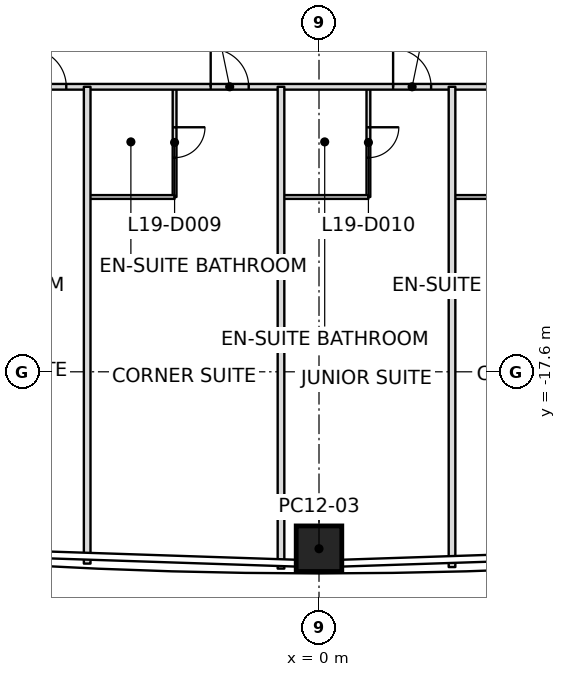
"""IFC4 building model, lengths in metres.
Left out: names, types, materials, properties, quantities, classifications, styles, units other than length and angle.
Written with IfcOpenShell. Run it as: python <this file> out.ifc"""

import sys

from ifc_helpers import new_model, si_unit, direction, frame, frame_2d, origin, origin_2d, place, context, subcontext, project, spatial, rectangle, extrude, element, fill, save


model = new_model("IFC4")
c1 = context("Model", 3, precision=1e-05, world=origin(), true_north=direction((0.0, 1.0)))
c2 = subcontext(c1, "Body", "Model", "MODEL_VIEW")
j1 = project(units=[si_unit("LENGTHUNIT", "METRE"), si_unit("PLANEANGLEUNIT", "RADIAN")], contexts=[c1])
p1 = place(None, origin())
s1 = spatial("IfcSite", under=j1, at=p1, CompositionType="ELEMENT")
p2 = place(p1, origin())
s2 = spatial("IfcBuilding", under=s1, at=p2, CompositionType="ELEMENT")
p3 = place(p2, frame((0.0, 0.0, 92.4)))
s3 = spatial("IfcBuildingStorey", under=s2, at=p3, CompositionType="ELEMENT", Elevation=92.4)
p4 = place(p3, frame((0.0, -22.256, 0.0), z_axis=(0.0, 0.012337408793, 0.999923891276), x_axis=(1.0, 0.0, 0.0)))
e1 = element("IfcColumn", 1, at=p4, inside=s3, PredefinedType="COLUMN", context=c2, shape_type="SweptSolid", body=[
    extrude(rectangle(XDim=1.2, YDim=1.2, at=origin_2d()), origin(), (0.0, 0.0, 1.0), 3.7),
])
p5 = place(p3, frame((-6.1, -10.1, 0.0), z_axis=(0.0, 0.0, 1.0), x_axis=(0.0, -1.0, 0.0)))
e2 = element("IfcWall", 2, at=p5, inside=s3, PredefinedType="PARTITIONING", context=c2, shape_type="SweptSolid", body=[
    extrude(rectangle(XDim=12.547, YDim=0.175, at=frame_2d((6.273, 0.0))), origin(), (0.0, 0.0, 1.0), 2.934),
])
p6 = place(p3, frame((-1.0, -10.1, 0.0), z_axis=(0.0, 0.0, 1.0), x_axis=(0.0, -1.0, 0.0)))
e3 = element("IfcWall", 3, at=p6, inside=s3, PredefinedType="PARTITIONING", context=c2, shape_type="SweptSolid", body=[
    extrude(rectangle(XDim=12.678, YDim=0.175, at=frame_2d((6.339, 0.0))), origin(), (0.0, 0.0, 1.0), 2.934),
])
p7 = place(p3, frame((3.5, -10.1, 0.0), z_axis=(0.0, 0.0, 1.0), x_axis=(0.0, -1.0, 0.0)))
e4 = element("IfcWall", 4, at=p7, inside=s3, PredefinedType="PARTITIONING", context=c2, shape_type="SweptSolid", body=[
    extrude(rectangle(XDim=12.638, YDim=0.175, at=frame_2d((6.319, 0.0))), origin(), (0.0, 0.0, 1.0), 2.934),
])
p8 = place(p3, frame((-13.02, -10.1, 0.0), z_axis=(0.0, 0.0, 1.0), x_axis=(1.0, 0.0, 0.0)))
e5 = element("IfcWall", 5, at=p8, inside=s3, PredefinedType="PARTITIONING", context=c2, shape_type="SweptSolid", body=[
    extrude(rectangle(XDim=26.04, YDim=0.15, at=frame_2d((13.02, 0.0))), origin(), (0.0, 0.0, 1.0), 2.947),
])
p9 = place(p8, frame((5.37, 0.0, 0.0)))
e6 = element("IfcOpeningElement", 6, at=p9, cuts=e5, PredefinedType="OPENING", context=c2, shape_type="SweptSolid", body=[
    extrude(rectangle(XDim=1.0, YDim=2.1, at=frame_2d((0.5, 1.05))), frame((0.0, 0.075, 0.0), z_axis=(0.0, -1.0, 0.0), x_axis=(1.0, 0.0, 0.0)), (0.0, 0.0, 1.0), 0.15),
])
p10 = place(p8, frame((10.17, 0.0, 0.0)))
e7 = element("IfcOpeningElement", 7, at=p10, cuts=e5, PredefinedType="OPENING", context=c2, shape_type="SweptSolid", body=[
    extrude(rectangle(XDim=1.0, YDim=2.1, at=frame_2d((0.5, 1.05))), frame((0.0, 0.075, 0.0), z_axis=(0.0, -1.0, 0.0), x_axis=(1.0, 0.0, 0.0)), (0.0, 0.0, 1.0), 0.15),
])
p11 = place(p8, frame((14.97, 0.0, 0.0)))
e8 = element("IfcOpeningElement", 8, at=p11, cuts=e5, PredefinedType="OPENING", context=c2, shape_type="SweptSolid", body=[
    extrude(rectangle(XDim=1.0, YDim=2.1, at=frame_2d((0.5, 1.05))), frame((0.0, 0.075, 0.0), z_axis=(0.0, -1.0, 0.0), x_axis=(1.0, 0.0, 0.0)), (0.0, 0.0, 1.0), 0.15),
])
p12 = place(p8, frame((19.77, 0.0, 0.0)))
e9 = element("IfcOpeningElement", 9, at=p12, cuts=e5, PredefinedType="OPENING", context=c2, shape_type="SweptSolid", body=[
    extrude(rectangle(XDim=1.0, YDim=2.1, at=frame_2d((0.5, 1.05))), frame((0.0, 0.075, 0.0), z_axis=(0.0, -1.0, 0.0), x_axis=(1.0, 0.0, 0.0)), (0.0, 0.0, 1.0), 0.15),
])
p13 = place(p3, frame((-3.8, -10.13, 0.0), z_axis=(0.0, 0.0, 1.0), x_axis=(0.0, -1.0, 0.0)))
e10 = element("IfcWall", 10, at=p13, inside=s3, PredefinedType="PARTITIONING", context=c2, shape_type="SweptSolid", body=[
    extrude(rectangle(XDim=2.87, YDim=0.1, at=frame_2d((1.435, 0.0))), origin(), (0.0, 0.0, 1.0), 3.15),
])
p14 = place(p13, frame((1.035, 0.0, 0.0)))
e11 = element("IfcOpeningElement", 11, at=p14, cuts=e10, PredefinedType="OPENING", context=c2, shape_type="SweptSolid", body=[
    extrude(rectangle(XDim=0.8, YDim=2.1, at=frame_2d((0.4, 1.05))), frame((0.0, 0.05, 0.0), z_axis=(0.0, -1.0, 0.0), x_axis=(1.0, 0.0, 0.0)), (0.0, 0.0, 1.0), 0.1),
])
p15 = place(p3, frame((-3.8, -13.0, 0.0), z_axis=(0.0, 0.0, 1.0), x_axis=(-1.0, 0.0, 0.0)))
e12 = element("IfcWall", 12, at=p15, inside=s3, PredefinedType="PARTITIONING", context=c2, shape_type="SweptSolid", body=[
    extrude(rectangle(XDim=2.27, YDim=0.1, at=frame_2d((1.135, 0.0))), origin(), (0.0, 0.0, 1.0), 3.017),
])
p16 = place(p3, frame((1.3, -10.13, 0.0), z_axis=(0.0, 0.0, 1.0), x_axis=(0.0, -1.0, 0.0)))
e13 = element("IfcWall", 13, at=p16, inside=s3, PredefinedType="PARTITIONING", context=c2, shape_type="SweptSolid", body=[
    extrude(rectangle(XDim=2.87, YDim=0.1, at=frame_2d((1.435, 0.0))), origin(), (0.0, 0.0, 1.0), 3.15),
])
p17 = place(p16, frame((1.035, 0.0, 0.0)))
e14 = element("IfcOpeningElement", 14, at=p17, cuts=e13, PredefinedType="OPENING", context=c2, shape_type="SweptSolid", body=[
    extrude(rectangle(XDim=0.8, YDim=2.1, at=frame_2d((0.4, 1.05))), frame((0.0, 0.05, 0.0), z_axis=(0.0, -1.0, 0.0), x_axis=(1.0, 0.0, 0.0)), (0.0, 0.0, 1.0), 0.1),
])
p18 = place(p3, frame((1.3, -13.0, 0.0), z_axis=(0.0, 0.0, 1.0), x_axis=(-1.0, 0.0, 0.0)))
e15 = element("IfcWall", 15, at=p18, inside=s3, PredefinedType="PARTITIONING", context=c2, shape_type="SweptSolid", body=[
    extrude(rectangle(XDim=2.27, YDim=0.1, at=frame_2d((1.135, 0.0))), origin(), (0.0, 0.0, 1.0), 3.15),
])
p19 = place(p3, frame((5.8, -13.0, 0.0), z_axis=(0.0, 0.0, 1.0), x_axis=(-1.0, 0.0, 0.0)))
e16 = element("IfcWall", 16, at=p19, inside=s3, PredefinedType="PARTITIONING", context=c2, shape_type="SweptSolid", body=[
    extrude(rectangle(XDim=2.27, YDim=0.1, at=frame_2d((1.135, 0.0))), origin(), (0.0, 0.0, 1.0), 3.017),
])
p20 = place(p9, origin())
e17 = element("IfcDoor", 17, at=p20, inside=s3, OperationType="SINGLE_SWING_LEFT", PredefinedType="DOOR", context=c2, shape_type="SweptSolid", body=[
    extrude(rectangle(XDim=1.0, YDim=2.1, at=frame_2d((0.5, 1.05))), frame((0.0, 0.025, 0.0), z_axis=(0.0, -1.0, 0.0), x_axis=(1.0, 0.0, 0.0)), (0.0, 0.0, 1.0), 0.05),
])
fill(e6, e17)
p21 = place(p10, origin())
e18 = element("IfcDoor", 18, at=p21, inside=s3, OperationType="SINGLE_SWING_LEFT", PredefinedType="DOOR", context=c2, shape_type="SweptSolid", body=[
    extrude(rectangle(XDim=1.0, YDim=2.1, at=frame_2d((0.5, 1.05))), frame((0.0, 0.025, 0.0), z_axis=(0.0, -1.0, 0.0), x_axis=(1.0, 0.0, 0.0)), (0.0, 0.0, 1.0), 0.05),
])
fill(e7, e18)
p22 = place(p14, origin())
e19 = element("IfcDoor", 19, at=p22, inside=s3, OperationType="SINGLE_SWING_RIGHT", PredefinedType="DOOR", context=c2, shape_type="SweptSolid", body=[
    extrude(rectangle(XDim=0.8, YDim=2.1, at=frame_2d((0.4, 1.05))), frame((0.0, 0.025, 0.0), z_axis=(0.0, -1.0, 0.0), x_axis=(1.0, 0.0, 0.0)), (0.0, 0.0, 1.0), 0.05),
])
fill(e11, e19)
p23 = place(p11, origin())
e20 = element("IfcDoor", 20, at=p23, inside=s3, OperationType="SINGLE_SWING_LEFT", PredefinedType="DOOR", context=c2, shape_type="SweptSolid", body=[
    extrude(rectangle(XDim=1.0, YDim=2.1, at=frame_2d((0.5, 1.05))), frame((0.0, 0.025, 0.0), z_axis=(0.0, -1.0, 0.0), x_axis=(1.0, 0.0, 0.0)), (0.0, 0.0, 1.0), 0.05),
])
fill(e8, e20)
p24 = place(p17, origin())
e21 = element("IfcDoor", 21, at=p24, inside=s3, OperationType="SINGLE_SWING_LEFT", PredefinedType="DOOR", context=c2, shape_type="SweptSolid", body=[
    extrude(rectangle(XDim=0.8, YDim=2.1, at=frame_2d((0.4, 1.05))), frame((0.0, 0.025, 0.0), z_axis=(0.0, -1.0, 0.0), x_axis=(1.0, 0.0, 0.0)), (0.0, 0.0, 1.0), 0.05),
])
fill(e14, e21)
save(model, sys.argv[1])
